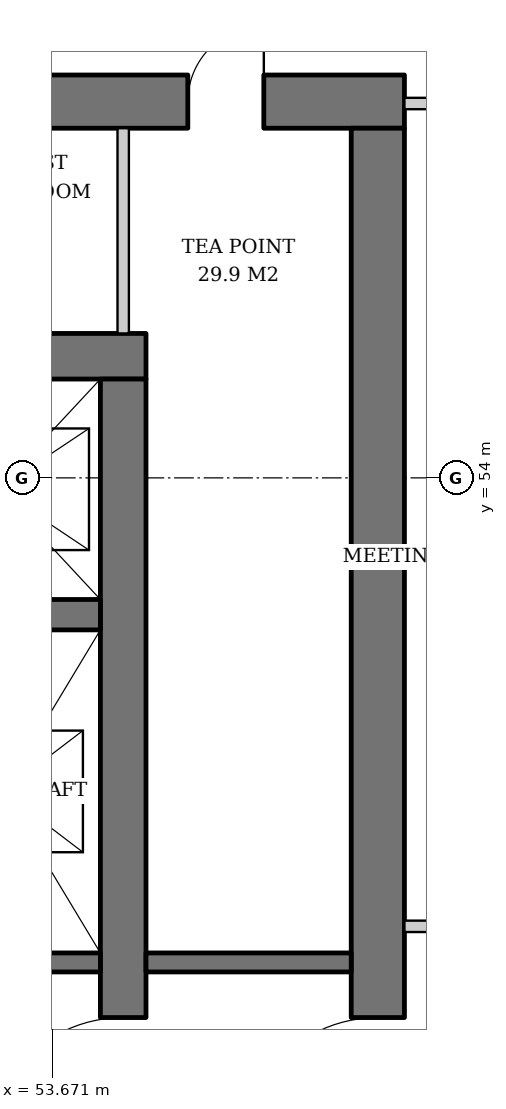
"""IFC4 building model, lengths in metres.
Left out: names, types, materials, properties, quantities, classifications, styles, units other than length and angle.
Written with IfcOpenShell. Run it as: python <this file> out.ifc"""

import sys

from ifc_helpers import new_model, si_unit, direction, frame, frame_2d, origin, place, context, subcontext, project, spatial, rectangle, extrude, element, fill, save


model = new_model("IFC4")
c1 = context("Model", 3, precision=1e-05, world=origin(), true_north=direction((0.0, 1.0)))
c2 = subcontext(c1, "Body", "Model", "MODEL_VIEW")
j1 = project(units=[si_unit("LENGTHUNIT", "METRE"), si_unit("PLANEANGLEUNIT", "RADIAN")], contexts=[c1])
p1 = place(None, origin())
s1 = spatial("IfcSite", under=j1, at=p1, CompositionType="ELEMENT")
p2 = place(p1, origin())
s2 = spatial("IfcBuilding", under=s1, at=p2, CompositionType="ELEMENT")
p3 = place(p2, frame((0.0, 0.0, 146.4)))
s3 = spatial("IfcBuildingStorey", under=s2, at=p3, CompositionType="ELEMENT", Elevation=146.4)
p4 = place(p3, frame((35.1, 55.6, 0.0), z_axis=(0.0, 0.0, 1.0), x_axis=(1.0, 0.0, 0.0)))
e1 = element("IfcWall", 1, at=p4, inside=s3, PredefinedType="SHEAR", context=c2, shape_type="SweptSolid", body=[
    extrude(rectangle(XDim=19.8, YDim=0.6, at=frame_2d((9.9, 0.0))), origin(), (0.0, 0.0, 1.0), 3.8),
])
p5 = place(p4, frame((14.54, 0.0, 0.0)))
e2 = element("IfcOpeningElement", 2, at=p5, cuts=e1, PredefinedType="OPENING", context=c2, shape_type="SweptSolid", body=[
    extrude(rectangle(XDim=1.0, YDim=2.1, at=frame_2d((0.5, 1.05))), frame((0.0, 0.31, 0.0), z_axis=(0.0, -1.0, 0.0), x_axis=(1.0, 0.0, 0.0)), (0.0, 0.0, 1.0), 0.62),
])
p6 = place(p4, frame((2.425, 0.0, 0.0)))
e3 = element("IfcOpeningElement", 3, at=p6, cuts=e1, PredefinedType="OPENING", context=c2, shape_type="SweptSolid", body=[
    extrude(rectangle(XDim=1.0, YDim=2.1, at=frame_2d((0.5, 1.05))), frame((0.0, 0.31, 0.0), z_axis=(0.0, -1.0, 0.0), x_axis=(1.0, 0.0, 0.0)), (0.0, 0.0, 1.0), 0.62),
])
p7 = place(p3, frame((54.6, 36.7, 0.0), z_axis=(0.0, 0.0, 1.0), x_axis=(0.0, 1.0, 0.0)))
e4 = element("IfcWall", 4, at=p7, inside=s3, PredefinedType="SHEAR", context=c2, shape_type="SweptSolid", body=[
    extrude(rectangle(XDim=18.6, YDim=0.6, at=frame_2d((9.3, 0.0))), origin(), (0.0, 0.0, 1.0), 3.8),
])
p8 = place(p7, frame((8.4, 0.0, 0.0)))
e5 = element("IfcOpeningElement", 5, at=p8, cuts=e4, PredefinedType="OPENING", context=c2, shape_type="SweptSolid", body=[
    extrude(rectangle(XDim=1.8, YDim=2.4, at=frame_2d((0.9, 1.2))), frame((0.0, 0.31, 0.0), z_axis=(0.0, -1.0, 0.0), x_axis=(1.0, 0.0, 0.0)), (0.0, 0.0, 1.0), 0.62),
])
p9 = place(p3, frame((31.7, 58.95, 0.0), z_axis=(0.0, 0.0, 1.0), x_axis=(1.0, 0.0, 0.0)))
e6 = element("IfcWall", 6, at=p9, inside=s3, PredefinedType="SHEAR", context=c2, shape_type="SweptSolid", body=[
    extrude(rectangle(XDim=26.6, YDim=0.7, at=frame_2d((13.3, 0.0))), origin(), (0.0, 0.0, 1.0), 3.8),
])
p10 = place(p9, frame((17.94, 0.0, 0.0)))
e7 = element("IfcOpeningElement", 7, at=p10, cuts=e6, PredefinedType="OPENING", context=c2, shape_type="SweptSolid", body=[
    extrude(rectangle(XDim=1.0, YDim=2.1, at=frame_2d((0.5, 1.05))), frame((0.0, 0.36, 0.0), z_axis=(0.0, -1.0, 0.0), x_axis=(1.0, 0.0, 0.0)), (0.0, 0.0, 1.0), 0.72),
])
p11 = place(p9, frame((5.825, 0.0, 0.0)))
e8 = element("IfcOpeningElement", 8, at=p11, cuts=e6, PredefinedType="OPENING", context=c2, shape_type="SweptSolid", body=[
    extrude(rectangle(XDim=1.0, YDim=2.1, at=frame_2d((0.5, 1.05))), frame((0.0, 0.36, 0.0), z_axis=(0.0, -1.0, 0.0), x_axis=(1.0, 0.0, 0.0)), (0.0, 0.0, 1.0), 0.72),
])
p12 = place(p9, frame((1.551, 0.0, 0.0)))
e9 = element("IfcOpeningElement", 9, at=p12, cuts=e6, PredefinedType="OPENING", context=c2, shape_type="SweptSolid", body=[
    extrude(rectangle(XDim=1.0, YDim=2.1, at=frame_2d((0.5, 1.05))), frame((0.0, 0.36, 0.0), z_axis=(0.0, -1.0, 0.0), x_axis=(1.0, 0.0, 0.0)), (0.0, 0.0, 1.0), 0.72),
])
p13 = place(p9, frame((3.638, 0.0, 0.0)))
e10 = element("IfcOpeningElement", 10, at=p13, cuts=e6, PredefinedType="OPENING", context=c2, shape_type="SweptSolid", body=[
    extrude(rectangle(XDim=1.0, YDim=2.1, at=frame_2d((0.5, 1.05))), frame((0.0, 0.36, 0.0), z_axis=(0.0, -1.0, 0.0), x_axis=(1.0, 0.0, 0.0)), (0.0, 0.0, 1.0), 0.72),
])
p14 = place(p9, frame((8.342, 0.0, 0.0)))
e11 = element("IfcOpeningElement", 11, at=p14, cuts=e6, PredefinedType="OPENING", context=c2, shape_type="SweptSolid", body=[
    extrude(rectangle(XDim=1.0, YDim=2.1, at=frame_2d((0.5, 1.05))), frame((0.0, 0.36, 0.0), z_axis=(0.0, -1.0, 0.0), x_axis=(1.0, 0.0, 0.0)), (0.0, 0.0, 1.0), 0.72),
])
p15 = place(p9, frame((11.626, 0.0, 0.0)))
e12 = element("IfcOpeningElement", 12, at=p15, cuts=e6, PredefinedType="OPENING", context=c2, shape_type="SweptSolid", body=[
    extrude(rectangle(XDim=1.0, YDim=2.1, at=frame_2d((0.5, 1.05))), frame((0.0, 0.36, 0.0), z_axis=(0.0, -1.0, 0.0), x_axis=(1.0, 0.0, 0.0)), (0.0, 0.0, 1.0), 0.72),
])
p16 = place(p9, frame((14.862, 0.0, 0.0)))
e13 = element("IfcOpeningElement", 13, at=p16, cuts=e6, PredefinedType="OPENING", context=c2, shape_type="SweptSolid", body=[
    extrude(rectangle(XDim=1.0, YDim=2.1, at=frame_2d((0.5, 1.05))), frame((0.0, 0.36, 0.0), z_axis=(0.0, -1.0, 0.0), x_axis=(1.0, 0.0, 0.0)), (0.0, 0.0, 1.0), 0.72),
])
p17 = place(p9, frame((20.9, 0.0, 0.0)))
e14 = element("IfcOpeningElement", 14, at=p17, cuts=e6, PredefinedType="OPENING", context=c2, shape_type="SweptSolid", body=[
    extrude(rectangle(XDim=1.0, YDim=2.1, at=frame_2d((0.5, 1.05))), frame((0.0, 0.36, 0.0), z_axis=(0.0, -1.0, 0.0), x_axis=(1.0, 0.0, 0.0)), (0.0, 0.0, 1.0), 0.72),
])
p18 = place(p9, frame((23.75, 0.0, 0.0)))
e15 = element("IfcOpeningElement", 15, at=p18, cuts=e6, PredefinedType="OPENING", context=c2, shape_type="SweptSolid", body=[
    extrude(rectangle(XDim=1.0, YDim=2.1, at=frame_2d((0.5, 1.05))), frame((0.0, 0.36, 0.0), z_axis=(0.0, -1.0, 0.0), x_axis=(1.0, 0.0, 0.0)), (0.0, 0.0, 1.0), 0.72),
])
p19 = place(p3, frame((57.95, 33.4, 0.0), z_axis=(0.0, 0.0, 1.0), x_axis=(0.0, 1.0, 0.0)))
e16 = element("IfcWall", 16, at=p19, inside=s3, PredefinedType="SHEAR", context=c2, shape_type="SweptSolid", body=[
    extrude(rectangle(XDim=25.2, YDim=0.7, at=frame_2d((12.6, 0.0))), origin(), (0.0, 0.0, 1.0), 3.8),
])
p20 = place(p19, frame((11.7, 0.0, 0.0)))
e17 = element("IfcOpeningElement", 17, at=p20, cuts=e16, PredefinedType="OPENING", context=c2, shape_type="SweptSolid", body=[
    extrude(rectangle(XDim=1.8, YDim=2.4, at=frame_2d((0.9, 1.2))), frame((0.0, 0.36, 0.0), z_axis=(0.0, -1.0, 0.0), x_axis=(1.0, 0.0, 0.0)), (0.0, 0.0, 1.0), 0.72),
])
p21 = place(p3, frame((35.7, 52.2, 0.0), z_axis=(0.0, 0.0, 1.0), x_axis=(1.0, 0.0, 0.0)))
e18 = element("IfcWall", 18, at=p21, inside=s3, PredefinedType="SHEAR", context=c2, shape_type="SweptSolid", body=[
    extrude(rectangle(XDim=18.6, YDim=0.4, at=frame_2d((9.3, 0.0))), origin(), (0.0, 0.0, 1.0), 3.8),
])
p22 = place(p3, frame((48.93, 47.625, 0.0), z_axis=(0.0, 0.0, 1.0), x_axis=(1.0, 0.0, 0.0)))
e19 = element("IfcWall", 19, at=p22, inside=s3, PredefinedType="SHEAR", context=c2, shape_type="SweptSolid", body=[
    extrude(rectangle(XDim=5.37, YDim=0.25, at=frame_2d((2.685, 0.0))), origin(), (0.0, 0.0, 1.0), 3.8),
])
p23 = place(p3, frame((54.9, 47.625, 0.0), z_axis=(0.0, 0.0, 1.0), x_axis=(1.0, 0.0, 0.0)))
e20 = element("IfcWall", 20, at=p23, inside=s3, PredefinedType="SOLIDWALL", context=c2, shape_type="SweptSolid", body=[
    extrude(rectangle(XDim=2.7, YDim=0.25, at=frame_2d((1.35, 0.0))), origin(), (0.0, 0.0, 1.0), 3.62),
])
p24 = place(p3, frame((54.6, 55.9, 0.0), z_axis=(0.0, 0.0, 1.0), x_axis=(0.0, 1.0, 0.0)))
e21 = element("IfcWall", 21, at=p24, inside=s3, PredefinedType="SOLIDWALL", context=c2, shape_type="SweptSolid", body=[
    extrude(rectangle(XDim=2.7, YDim=0.15, at=frame_2d((1.35, 0.0))), origin(), (0.0, 0.0, 1.0), 3.62),
])
for number, where, z_axis, x_axis in (
    (22, (58.3, 48.1, 0.0), (0.0, 0.0, 1.0), (1.0, 0.0, 0.0)),
    (23, (58.3, 58.925, 0.0), (0.0, 0.0, 1.0), (1.0, 0.0, 0.0)),
):
    element("IfcWall", number, at=place(p3, frame(where, z_axis=z_axis, x_axis=x_axis)), inside=s3, PredefinedType="PARTITIONING", context=c2, shape_type="SweptSolid", body=[
        extrude(rectangle(XDim=1.725, YDim=0.15, at=frame_2d((0.862, 0.0))), origin(), (0.0, 0.0, 1.0), 3.62),
    ])
p25 = place(p8, origin())
e24 = element("IfcDoor", 24, at=p25, inside=s3, OperationType="DOUBLE_DOOR_SINGLE_SWING", PredefinedType="DOOR", context=c2, shape_type="SweptSolid", body=[
    extrude(rectangle(XDim=1.8, YDim=2.4, at=frame_2d((0.9, 1.2))), frame((0.0, 0.025, 0.0), z_axis=(0.0, -1.0, 0.0), x_axis=(1.0, 0.0, 0.0)), (0.0, 0.0, 1.0), 0.05),
])
fill(e5, e24)
p26 = place(p20, origin())
e25 = element("IfcDoor", 25, at=p26, inside=s3, OperationType="DOUBLE_DOOR_SINGLE_SWING", PredefinedType="DOOR", context=c2, shape_type="SweptSolid", body=[
    extrude(rectangle(XDim=1.8, YDim=2.4, at=frame_2d((0.9, 1.2))), frame((0.0, 0.025, 0.0), z_axis=(0.0, -1.0, 0.0), x_axis=(1.0, 0.0, 0.0)), (0.0, 0.0, 1.0), 0.05),
])
fill(e17, e25)
p27 = place(p18, origin())
e26 = element("IfcDoor", 26, at=p27, inside=s3, OperationType="SINGLE_SWING_RIGHT", PredefinedType="DOOR", context=c2, shape_type="SweptSolid", body=[
    extrude(rectangle(XDim=1.0, YDim=2.1, at=frame_2d((0.5, 1.05))), frame((0.0, -0.29, 0.0), z_axis=(0.0, -1.0, 0.0), x_axis=(1.0, 0.0, 0.0)), (0.0, 0.0, 1.0), 0.05),
])
fill(e15, e26)
save(model, sys.argv[1])
